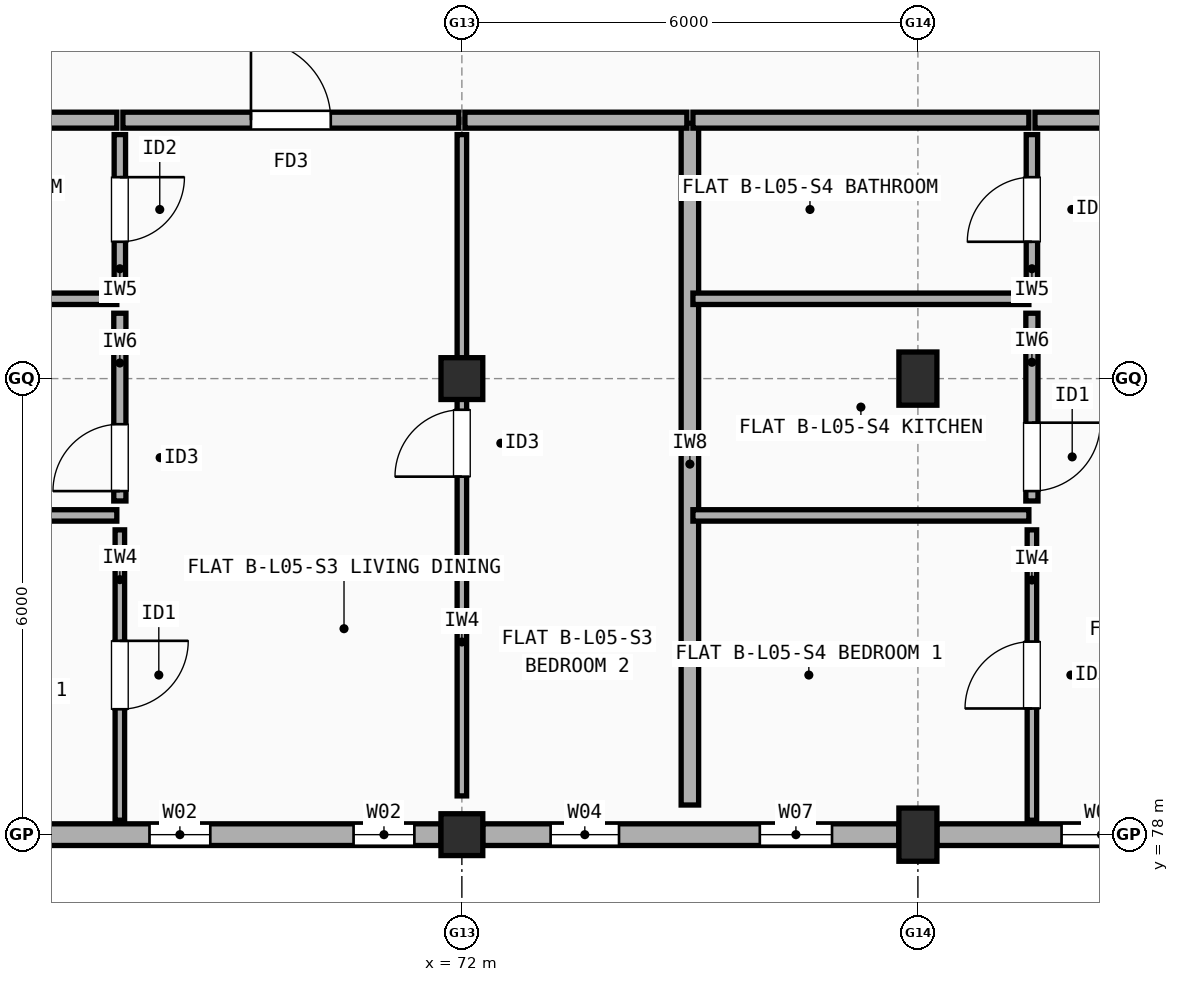
"""IFC4 building model, lengths in metres.
Left out: names, types, materials, properties, quantities, classifications, styles, units other than length and angle.
Written with IfcOpenShell. Run it as: python <this file> out.ifc"""

import sys

from ifc_helpers import new_model, si_unit, direction, frame, frame_2d, origin, origin_2d, place, context, subcontext, project, spatial, rectangle, extrude, element, fill, save


model = new_model("IFC4")
c1 = context("Model", 3, precision=1e-05, world=origin(), true_north=direction((0.0, 1.0)))
c2 = subcontext(c1, "Body", "Model", "MODEL_VIEW")
j1 = project(units=[si_unit("LENGTHUNIT", "METRE"), si_unit("PLANEANGLEUNIT", "RADIAN")], contexts=[c1])
p1 = place(None, origin())
s1 = spatial("IfcSite", under=j1, at=p1, CompositionType="ELEMENT")
p2 = place(p1, origin())
s2 = spatial("IfcBuilding", under=s1, at=p2, CompositionType="ELEMENT")
p3 = place(p2, frame((0.0, 0.0, 17.3)))
s3 = spatial("IfcBuildingStorey", under=s2, at=p3, CompositionType="ELEMENT", Elevation=17.3)
for number, where, z_axis, x_axis in (
    (1, (72.0, 78.0, 0.0), (0.0, 0.0, 1.0), (1.0, 0.0, 0.0)),
    (2, (72.0, 84.0, 0.0), (0.0, 0.0, 1.0), (1.0, 0.0, 0.0)),
):
    element("IfcColumn", number, at=place(p3, frame(where, z_axis=z_axis, x_axis=x_axis)), inside=s3, PredefinedType="COLUMN", context=c2, shape_type="SweptSolid", body=[
        extrude(rectangle(XDim=0.55, YDim=0.55, at=origin_2d()), origin(), (0.0, 0.0, 1.0), 2.965),
    ])
for number, where, z_axis, x_axis in (
    (3, (78.0, 78.0, 0.0), (0.0, 0.0, 1.0), (1.0, 0.0, 0.0)),
    (4, (78.0, 84.0, 0.0), (0.0, 0.0, 1.0), (1.0, 0.0, 0.0)),
):
    element("IfcColumn", number, at=place(p3, frame(where, z_axis=z_axis, x_axis=x_axis)), inside=s3, PredefinedType="COLUMN", context=c2, shape_type="SweptSolid", body=[
        extrude(rectangle(XDim=0.5, YDim=0.7, at=origin_2d()), origin(), (0.0, 0.0, 1.0), 2.965),
    ])
p4 = place(p3, frame((66.275, 78.0, 0.0), z_axis=(0.0, 0.0, 1.0), x_axis=(1.0, 0.0, 0.0)))
e5 = element("IfcWall", 5, at=p4, inside=s3, PredefinedType="STANDARD", context=c2, shape_type="SweptSolid", body=[
    extrude(rectangle(XDim=5.45, YDim=0.285, at=frame_2d((2.725, 0.0))), origin(), (0.0, 0.0, 1.0), 2.447),
])
p5 = place(p4, frame((1.615, 0.0, 0.9)))
e6 = element("IfcOpeningElement", 6, at=p5, cuts=e5, PredefinedType="OPENING", context=c2, shape_type="SweptSolid", body=[
    extrude(rectangle(XDim=0.8, YDim=1.2, at=frame_2d((0.4, 0.6))), frame((0.0, 0.152, 0.0), z_axis=(0.0, -1.0, 0.0), x_axis=(1.0, 0.0, 0.0)), (0.0, 0.0, 1.0), 0.305),
])
p6 = place(p4, frame((4.3, 0.0, 0.9)))
e7 = element("IfcOpeningElement", 7, at=p6, cuts=e5, PredefinedType="OPENING", context=c2, shape_type="SweptSolid", body=[
    extrude(rectangle(XDim=0.8, YDim=1.2, at=frame_2d((0.4, 0.6))), frame((0.0, 0.152, 0.0), z_axis=(0.0, -1.0, 0.0), x_axis=(1.0, 0.0, 0.0)), (0.0, 0.0, 1.0), 0.305),
])
p7 = place(p3, frame((72.275, 78.0, 0.0), z_axis=(0.0, 0.0, 1.0), x_axis=(1.0, 0.0, 0.0)))
e8 = element("IfcWall", 8, at=p7, inside=s3, PredefinedType="STANDARD", context=c2, shape_type="SweptSolid", body=[
    extrude(rectangle(XDim=5.475, YDim=0.285, at=frame_2d((2.738, 0.0))), origin(), (0.0, 0.0, 1.0), 2.447),
])
p8 = place(p7, frame((0.893, 0.0, 0.9)))
e9 = element("IfcOpeningElement", 9, at=p8, cuts=e8, PredefinedType="OPENING", context=c2, shape_type="SweptSolid", body=[
    extrude(rectangle(XDim=0.9, YDim=1.3, at=frame_2d((0.45, 0.65))), frame((0.0, 0.152, 0.0), z_axis=(0.0, -1.0, 0.0), x_axis=(1.0, 0.0, 0.0)), (0.0, 0.0, 1.0), 0.305),
])
p9 = place(p7, frame((3.645, 0.0, 0.9)))
e10 = element("IfcOpeningElement", 10, at=p9, cuts=e8, PredefinedType="OPENING", context=c2, shape_type="SweptSolid", body=[
    extrude(rectangle(XDim=0.95, YDim=1.35, at=frame_2d((0.475, 0.675))), frame((0.0, 0.152, 0.0), z_axis=(0.0, -1.0, 0.0), x_axis=(1.0, 0.0, 0.0)), (0.0, 0.0, 1.0), 0.305),
])
p10 = place(p3, frame((78.25, 78.0, 0.0), z_axis=(0.0, 0.0, 1.0), x_axis=(1.0, 0.0, 0.0)))
e11 = element("IfcWall", 11, at=p10, inside=s3, PredefinedType="STANDARD", context=c2, shape_type="SweptSolid", body=[
    extrude(rectangle(XDim=5.5, YDim=0.285, at=frame_2d((2.75, 0.0))), origin(), (0.0, 0.0, 1.0), 2.447),
])
p11 = place(p10, frame((1.64, 0.0, 0.9)))
e12 = element("IfcOpeningElement", 12, at=p11, cuts=e11, PredefinedType="OPENING", context=c2, shape_type="SweptSolid", body=[
    extrude(rectangle(XDim=1.05, YDim=1.35, at=frame_2d((0.525, 0.675))), frame((0.0, 0.152, 0.0), z_axis=(0.0, -1.0, 0.0), x_axis=(1.0, 0.0, 0.0)), (0.0, 0.0, 1.0), 0.305),
])
p12 = place(p10, frame((4.1, 0.0, 0.9)))
e13 = element("IfcOpeningElement", 13, at=p12, cuts=e11, PredefinedType="OPENING", context=c2, shape_type="SweptSolid", body=[
    extrude(rectangle(XDim=1.05, YDim=1.35, at=frame_2d((0.525, 0.675))), frame((0.0, 0.152, 0.0), z_axis=(0.0, -1.0, 0.0), x_axis=(1.0, 0.0, 0.0)), (0.0, 0.0, 1.0), 0.305),
])
p13 = place(p3, frame((75.0, 78.39, 0.0), z_axis=(0.0, 0.0, 1.0), x_axis=(0.0, 1.0, 0.0)))
e14 = element("IfcWall", 14, at=p13, inside=s3, PredefinedType="SOLIDWALL", context=c2, shape_type="SweptSolid", body=[
    extrude(rectangle(XDim=8.97, YDim=0.23, at=frame_2d((4.485, 0.0))), origin(), (0.0, 0.0, 1.0), 2.447),
])
p14 = place(p3, frame((63.04, 87.4, 0.0), z_axis=(0.0, 0.0, 1.0), x_axis=(1.0, 0.0, 0.0)))
e15 = element("IfcWall", 15, at=p14, inside=s3, PredefinedType="SOLIDWALL", context=c2, shape_type="SweptSolid", body=[
    extrude(rectangle(XDim=4.42, YDim=0.21, at=frame_2d((2.21, 0.0))), origin(), (0.0, 0.0, 1.0), 2.548),
])
p15 = place(p3, frame((67.54, 87.4, 0.0), z_axis=(0.0, 0.0, 1.0), x_axis=(1.0, 0.0, 0.0)))
e16 = element("IfcWall", 16, at=p15, inside=s3, PredefinedType="SOLIDWALL", context=c2, shape_type="SweptSolid", body=[
    extrude(rectangle(XDim=4.42, YDim=0.21, at=frame_2d((2.21, 0.0))), origin(), (0.0, 0.0, 1.0), 2.508),
])
p16 = place(p15, frame((1.685, 0.0, 0.0)))
e17 = element("IfcOpeningElement", 17, at=p16, cuts=e16, PredefinedType="OPENING", context=c2, shape_type="SweptSolid", body=[
    extrude(rectangle(XDim=1.05, YDim=2.15, at=frame_2d((0.525, 1.075))), frame((0.0, 0.115, 0.0), z_axis=(0.0, -1.0, 0.0), x_axis=(1.0, 0.0, 0.0)), (0.0, 0.0, 1.0), 0.23),
])
p17 = place(p3, frame((67.5, 78.19, 0.0), z_axis=(0.0, 0.0, 1.0), x_axis=(0.0, 1.0, 0.0)))
e18 = element("IfcWall", 18, at=p17, inside=s3, PredefinedType="PARTITIONING", context=c2, shape_type="SweptSolid", body=[
    extrude(rectangle(XDim=3.82, YDim=0.125, at=frame_2d((1.91, 0.0))), origin(), (0.0, 0.0, 1.0), 2.965),
])
p18 = place(p17, frame((1.46, 0.0, 0.0)))
e19 = element("IfcOpeningElement", 19, at=p18, cuts=e18, PredefinedType="OPENING", context=c2, shape_type="SweptSolid", body=[
    extrude(rectangle(XDim=0.9, YDim=2.1, at=frame_2d((0.45, 1.05))), frame((0.0, 0.073, 0.0), z_axis=(0.0, -1.0, 0.0), x_axis=(1.0, 0.0, 0.0)), (0.0, 0.0, 1.0), 0.145),
])
p19 = place(p3, frame((67.5, 82.39, 0.0), z_axis=(0.0, 0.0, 1.0), x_axis=(0.0, 1.0, 0.0)))
e20 = element("IfcWall", 20, at=p19, inside=s3, PredefinedType="PLUMBINGWALL", context=c2, shape_type="SweptSolid", body=[
    extrude(rectangle(XDim=2.47, YDim=0.16, at=frame_2d((1.235, 0.0))), origin(), (0.0, 0.0, 1.0), 2.447),
])
p20 = place(p19, frame((0.13, 0.0, 0.0)))
e21 = element("IfcOpeningElement", 21, at=p20, cuts=e20, PredefinedType="OPENING", context=c2, shape_type="SweptSolid", body=[
    extrude(rectangle(XDim=0.88, YDim=2.1, at=frame_2d((0.44, 1.05))), frame((0.0, 0.09, 0.0), z_axis=(0.0, -1.0, 0.0), x_axis=(1.0, 0.0, 0.0)), (0.0, 0.0, 1.0), 0.18),
])
p21 = place(p3, frame((67.5, 85.24, 0.0), z_axis=(0.0, 0.0, 1.0), x_axis=(0.0, 1.0, 0.0)))
e22 = element("IfcWall", 22, at=p21, inside=s3, PredefinedType="PARTITIONING", context=c2, shape_type="SweptSolid", body=[
    extrude(rectangle(XDim=1.97, YDim=0.15, at=frame_2d((0.985, 0.0))), origin(), (0.0, 0.0, 1.0), 2.965),
])
p22 = place(p21, frame((0.56, 0.0, 0.0)))
e23 = element("IfcOpeningElement", 23, at=p22, cuts=e22, PredefinedType="OPENING", context=c2, shape_type="SweptSolid", body=[
    extrude(rectangle(XDim=0.85, YDim=2.1, at=frame_2d((0.425, 1.05))), frame((0.0, 0.085, 0.0), z_axis=(0.0, -1.0, 0.0), x_axis=(1.0, 0.0, 0.0)), (0.0, 0.0, 1.0), 0.17),
])
p23 = place(p3, frame((63.04, 82.2, 0.0), z_axis=(0.0, 0.0, 1.0), x_axis=(1.0, 0.0, 0.0)))
e24 = element("IfcWall", 24, at=p23, inside=s3, PredefinedType="PARTITIONING", context=c2, shape_type="SweptSolid", body=[
    extrude(rectangle(XDim=4.42, YDim=0.15, at=frame_2d((2.21, 0.0))), origin(), (0.0, 0.0, 1.0), 2.458),
])
p24 = place(p3, frame((63.04, 85.05, 0.0), z_axis=(0.0, 0.0, 1.0), x_axis=(1.0, 0.0, 0.0)))
e25 = element("IfcWall", 25, at=p24, inside=s3, PredefinedType="PARTITIONING", context=c2, shape_type="SweptSolid", body=[
    extrude(rectangle(XDim=4.42, YDim=0.15, at=frame_2d((2.21, 0.0))), origin(), (0.0, 0.0, 1.0), 2.548),
])
p25 = place(p3, frame((72.04, 87.4, 0.0), z_axis=(0.0, 0.0, 1.0), x_axis=(1.0, 0.0, 0.0)))
e26 = element("IfcWall", 26, at=p25, inside=s3, PredefinedType="SOLIDWALL", context=c2, shape_type="SweptSolid", body=[
    extrude(rectangle(XDim=2.92, YDim=0.21, at=frame_2d((1.46, 0.0))), origin(), (0.0, 0.0, 1.0), 2.508),
])
p26 = place(p3, frame((72.0, 78.51, 0.0), z_axis=(0.0, 0.0, 1.0), x_axis=(0.0, 1.0, 0.0)))
e27 = element("IfcWall", 27, at=p26, inside=s3, PredefinedType="PARTITIONING", context=c2, shape_type="SweptSolid", body=[
    extrude(rectangle(XDim=8.7, YDim=0.125, at=frame_2d((4.35, 0.0))), origin(), (0.0, 0.0, 1.0), 2.508),
])
p27 = place(p26, frame((4.2, 0.0, 0.0)))
e28 = element("IfcOpeningElement", 28, at=p27, cuts=e27, PredefinedType="OPENING", context=c2, shape_type="SweptSolid", body=[
    extrude(rectangle(XDim=0.88, YDim=2.1, at=frame_2d((0.44, 1.05))), frame((0.0, 0.073, 0.0), z_axis=(0.0, -1.0, 0.0), x_axis=(1.0, 0.0, 0.0)), (0.0, 0.0, 1.0), 0.145),
])
p28 = place(p3, frame((75.04, 87.4, 0.0), z_axis=(0.0, 0.0, 1.0), x_axis=(1.0, 0.0, 0.0)))
e29 = element("IfcWall", 29, at=p28, inside=s3, PredefinedType="SOLIDWALL", context=c2, shape_type="SweptSolid", body=[
    extrude(rectangle(XDim=4.42, YDim=0.21, at=frame_2d((2.21, 0.0))), origin(), (0.0, 0.0, 1.0), 2.447),
])
p29 = place(p3, frame((79.54, 87.4, 0.0), z_axis=(0.0, 0.0, 1.0), x_axis=(1.0, 0.0, 0.0)))
e30 = element("IfcWall", 30, at=p29, inside=s3, PredefinedType="SOLIDWALL", context=c2, shape_type="SweptSolid", body=[
    extrude(rectangle(XDim=4.42, YDim=0.21, at=frame_2d((2.21, 0.0))), origin(), (0.0, 0.0, 1.0), 2.447),
])
p30 = place(p29, frame((1.72, 0.0, 0.0)))
e31 = element("IfcOpeningElement", 31, at=p30, cuts=e30, PredefinedType="OPENING", context=c2, shape_type="SweptSolid", body=[
    extrude(rectangle(XDim=0.98, YDim=2.15, at=frame_2d((0.49, 1.075))), frame((0.0, 0.115, 0.0), z_axis=(0.0, -1.0, 0.0), x_axis=(1.0, 0.0, 0.0)), (0.0, 0.0, 1.0), 0.23),
])
p31 = place(p3, frame((79.5, 78.19, 0.0), z_axis=(0.0, 0.0, 1.0), x_axis=(0.0, 1.0, 0.0)))
e32 = element("IfcWall", 32, at=p31, inside=s3, PredefinedType="PARTITIONING", context=c2, shape_type="SweptSolid", body=[
    extrude(rectangle(XDim=3.82, YDim=0.125, at=frame_2d((1.91, 0.0))), origin(), (0.0, 0.0, 1.0), 2.965),
])
p32 = place(p31, frame((1.47, 0.0, 0.0)))
e33 = element("IfcOpeningElement", 33, at=p32, cuts=e32, PredefinedType="OPENING", context=c2, shape_type="SweptSolid", body=[
    extrude(rectangle(XDim=0.88, YDim=2.1, at=frame_2d((0.44, 1.05))), frame((0.0, 0.073, 0.0), z_axis=(0.0, -1.0, 0.0), x_axis=(1.0, 0.0, 0.0)), (0.0, 0.0, 1.0), 0.145),
])
p33 = place(p3, frame((79.5, 82.39, 0.0), z_axis=(0.0, 0.0, 1.0), x_axis=(0.0, 1.0, 0.0)))
e34 = element("IfcWall", 34, at=p33, inside=s3, PredefinedType="PLUMBINGWALL", context=c2, shape_type="SweptSolid", body=[
    extrude(rectangle(XDim=2.47, YDim=0.16, at=frame_2d((1.235, 0.0))), origin(), (0.0, 0.0, 1.0), 2.447),
])
p34 = place(p33, frame((0.13, 0.0, 0.0)))
e35 = element("IfcOpeningElement", 35, at=p34, cuts=e34, PredefinedType="OPENING", context=c2, shape_type="SweptSolid", body=[
    extrude(rectangle(XDim=0.9, YDim=2.1, at=frame_2d((0.45, 1.05))), frame((0.0, 0.09, 0.0), z_axis=(0.0, -1.0, 0.0), x_axis=(1.0, 0.0, 0.0)), (0.0, 0.0, 1.0), 0.18),
])
p35 = place(p3, frame((79.5, 85.24, 0.0), z_axis=(0.0, 0.0, 1.0), x_axis=(0.0, 1.0, 0.0)))
e36 = element("IfcWall", 36, at=p35, inside=s3, PredefinedType="PARTITIONING", context=c2, shape_type="SweptSolid", body=[
    extrude(rectangle(XDim=1.97, YDim=0.15, at=frame_2d((0.985, 0.0))), origin(), (0.0, 0.0, 1.0), 2.965),
])
p36 = place(p35, frame((0.56, 0.0, 0.0)))
e37 = element("IfcOpeningElement", 37, at=p36, cuts=e36, PredefinedType="OPENING", context=c2, shape_type="SweptSolid", body=[
    extrude(rectangle(XDim=0.85, YDim=2.1, at=frame_2d((0.425, 1.05))), frame((0.0, 0.085, 0.0), z_axis=(0.0, -1.0, 0.0), x_axis=(1.0, 0.0, 0.0)), (0.0, 0.0, 1.0), 0.17),
])
for number, where, z_axis, x_axis in (
    (38, (75.04, 82.2, 0.0), (0.0, 0.0, 1.0), (1.0, 0.0, 0.0)),
    (39, (75.04, 85.05, 0.0), (0.0, 0.0, 1.0), (1.0, 0.0, 0.0)),
):
    element("IfcWall", number, at=place(p3, frame(where, z_axis=z_axis, x_axis=x_axis)), inside=s3, PredefinedType="PARTITIONING", context=c2, shape_type="SweptSolid", body=[
        extrude(rectangle(XDim=4.42, YDim=0.15, at=frame_2d((2.21, 0.0))), origin(), (0.0, 0.0, 1.0), 2.447),
    ])
p37 = place(p5, origin())
e40 = element("IfcWindow", 40, at=p37, inside=s3, PartitioningType="SINGLE_PANEL", PredefinedType="WINDOW", context=c2, shape_type="SweptSolid", body=[
    extrude(rectangle(XDim=0.8, YDim=1.2, at=frame_2d((0.4, 0.6))), frame((0.0, 0.03, 0.0), z_axis=(0.0, -1.0, 0.0), x_axis=(1.0, 0.0, 0.0)), (0.0, 0.0, 1.0), 0.06),
])
fill(e6, e40)
p38 = place(p6, origin())
e41 = element("IfcWindow", 41, at=p38, inside=s3, PartitioningType="SINGLE_PANEL", PredefinedType="WINDOW", context=c2, shape_type="SweptSolid", body=[
    extrude(rectangle(XDim=0.8, YDim=1.2, at=frame_2d((0.4, 0.6))), frame((0.0, 0.03, 0.0), z_axis=(0.0, -1.0, 0.0), x_axis=(1.0, 0.0, 0.0)), (0.0, 0.0, 1.0), 0.06),
])
fill(e7, e41)
p39 = place(p8, origin())
e42 = element("IfcWindow", 42, at=p39, inside=s3, PartitioningType="SINGLE_PANEL", PredefinedType="WINDOW", context=c2, shape_type="SweptSolid", body=[
    extrude(rectangle(XDim=0.9, YDim=1.3, at=frame_2d((0.45, 0.65))), frame((0.0, 0.03, 0.0), z_axis=(0.0, -1.0, 0.0), x_axis=(1.0, 0.0, 0.0)), (0.0, 0.0, 1.0), 0.06),
])
fill(e9, e42)
p40 = place(p9, origin())
e43 = element("IfcWindow", 43, at=p40, inside=s3, PartitioningType="SINGLE_PANEL", PredefinedType="WINDOW", context=c2, shape_type="SweptSolid", body=[
    extrude(rectangle(XDim=0.95, YDim=1.35, at=frame_2d((0.475, 0.675))), frame((0.0, 0.03, 0.0), z_axis=(0.0, -1.0, 0.0), x_axis=(1.0, 0.0, 0.0)), (0.0, 0.0, 1.0), 0.06),
])
fill(e10, e43)
p41 = place(p11, origin())
e44 = element("IfcWindow", 44, at=p41, inside=s3, PartitioningType="SINGLE_PANEL", PredefinedType="WINDOW", context=c2, shape_type="SweptSolid", body=[
    extrude(rectangle(XDim=1.05, YDim=1.35, at=frame_2d((0.525, 0.675))), frame((0.0, 0.03, 0.0), z_axis=(0.0, -1.0, 0.0), x_axis=(1.0, 0.0, 0.0)), (0.0, 0.0, 1.0), 0.06),
])
fill(e12, e44)
p42 = place(p16, origin())
e45 = element("IfcDoor", 45, at=p42, inside=s3, OperationType="SINGLE_SWING_LEFT", PredefinedType="DOOR", context=c2, shape_type="SweptSolid", body=[
    extrude(rectangle(XDim=1.05, YDim=2.15, at=frame_2d((0.525, 1.075))), frame((0.0, 0.025, 0.0), z_axis=(0.0, -1.0, 0.0), x_axis=(1.0, 0.0, 0.0)), (0.0, 0.0, 1.0), 0.05),
])
fill(e17, e45)
p43 = place(p18, origin())
e46 = element("IfcDoor", 46, at=p43, inside=s3, OperationType="SINGLE_SWING_RIGHT", PredefinedType="DOOR", context=c2, shape_type="SweptSolid", body=[
    extrude(rectangle(XDim=0.9, YDim=2.1, at=frame_2d((0.45, 1.05))), frame((0.0, 0.025, 0.0), z_axis=(0.0, -1.0, 0.0), x_axis=(1.0, 0.0, 0.0)), (0.0, 0.0, 1.0), 0.05),
])
fill(e19, e46)
p44 = place(p20, origin())
e47 = element("IfcDoor", 47, at=p44, inside=s3, OperationType="SINGLE_SWING_LEFT", PredefinedType="DOOR", context=c2, shape_type="SweptSolid", body=[
    extrude(rectangle(XDim=0.88, YDim=2.1, at=frame_2d((0.44, 1.05))), frame((0.0, 0.025, 0.0), z_axis=(0.0, -1.0, 0.0), x_axis=(1.0, 0.0, 0.0)), (0.0, 0.0, 1.0), 0.05),
])
fill(e21, e47)
p45 = place(p22, origin())
e48 = element("IfcDoor", 48, at=p45, inside=s3, OperationType="SINGLE_SWING_RIGHT", PredefinedType="DOOR", context=c2, shape_type="SweptSolid", body=[
    extrude(rectangle(XDim=0.85, YDim=2.1, at=frame_2d((0.425, 1.05))), frame((0.0, 0.025, 0.0), z_axis=(0.0, -1.0, 0.0), x_axis=(1.0, 0.0, 0.0)), (0.0, 0.0, 1.0), 0.05),
])
fill(e23, e48)
p46 = place(p27, origin())
e49 = element("IfcDoor", 49, at=p46, inside=s3, OperationType="SINGLE_SWING_LEFT", PredefinedType="DOOR", context=c2, shape_type="SweptSolid", body=[
    extrude(rectangle(XDim=0.88, YDim=2.1, at=frame_2d((0.44, 1.05))), frame((0.0, 0.025, 0.0), z_axis=(0.0, -1.0, 0.0), x_axis=(1.0, 0.0, 0.0)), (0.0, 0.0, 1.0), 0.05),
])
fill(e28, e49)
p47 = place(p32, origin())
e50 = element("IfcDoor", 50, at=p47, inside=s3, OperationType="SINGLE_SWING_LEFT", PredefinedType="DOOR", context=c2, shape_type="SweptSolid", body=[
    extrude(rectangle(XDim=0.88, YDim=2.1, at=frame_2d((0.44, 1.05))), frame((0.0, 0.025, 0.0), z_axis=(0.0, -1.0, 0.0), x_axis=(1.0, 0.0, 0.0)), (0.0, 0.0, 1.0), 0.05),
])
fill(e33, e50)
p48 = place(p34, origin())
e51 = element("IfcDoor", 51, at=p48, inside=s3, OperationType="SINGLE_SWING_RIGHT", PredefinedType="DOOR", context=c2, shape_type="SweptSolid", body=[
    extrude(rectangle(XDim=0.9, YDim=2.1, at=frame_2d((0.45, 1.05))), frame((0.0, 0.025, 0.0), z_axis=(0.0, -1.0, 0.0), x_axis=(1.0, 0.0, 0.0)), (0.0, 0.0, 1.0), 0.05),
])
fill(e35, e51)
p49 = place(p36, origin())
e52 = element("IfcDoor", 52, at=p49, inside=s3, OperationType="SINGLE_SWING_LEFT", PredefinedType="DOOR", context=c2, shape_type="SweptSolid", body=[
    extrude(rectangle(XDim=0.85, YDim=2.1, at=frame_2d((0.425, 1.05))), frame((0.0, 0.025, 0.0), z_axis=(0.0, -1.0, 0.0), x_axis=(1.0, 0.0, 0.0)), (0.0, 0.0, 1.0), 0.05),
])
fill(e37, e52)
save(model, sys.argv[1])
